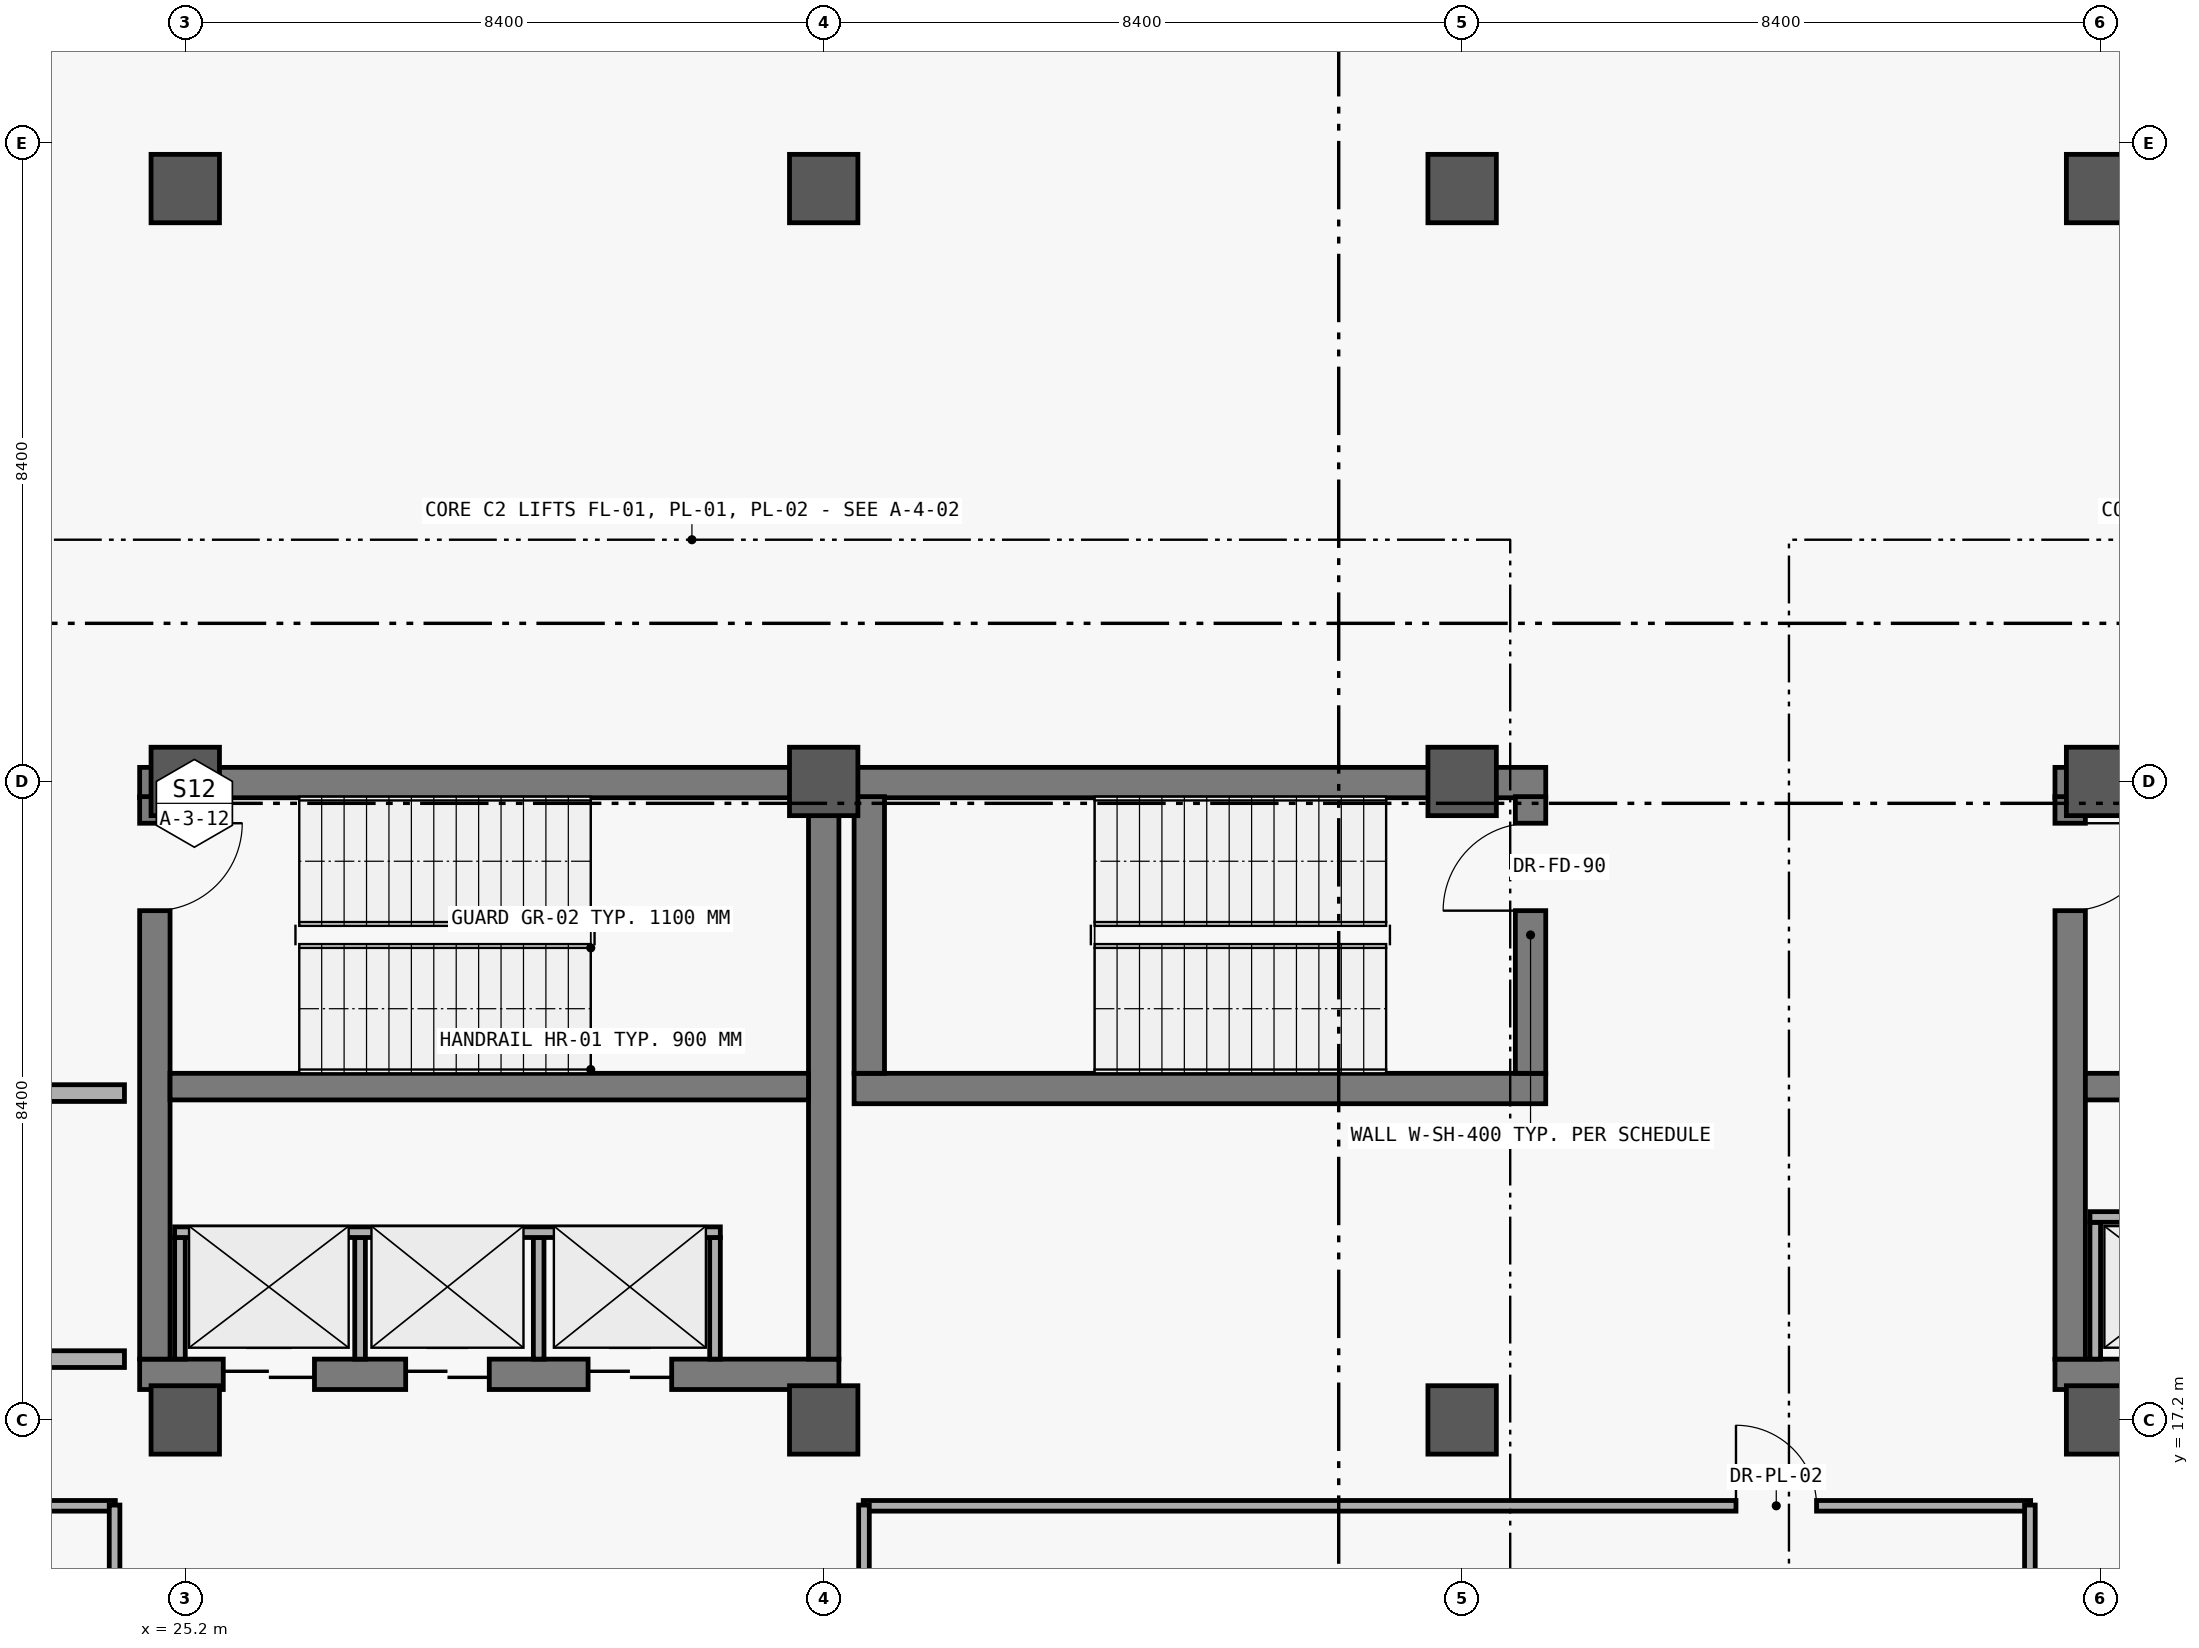
"""IFC4 building model, lengths in metres.
Left out: names, types, materials, properties, quantities, classifications, styles, units other than length and angle.
Written with IfcOpenShell. Run it as: python <this file> out.ifc"""

import sys

from ifc_helpers import new_model, si_unit, direction, frame, frame_2d, origin, origin_2d, place, context, subcontext, project, spatial, rectangle, extrude, element, fill, save


model = new_model("IFC4")
c1 = context("Model", 3, precision=1e-05, world=origin(), true_north=direction((0.0, 1.0)))
c2 = subcontext(c1, "Body", "Model", "MODEL_VIEW")
j1 = project(units=[si_unit("LENGTHUNIT", "METRE"), si_unit("PLANEANGLEUNIT", "RADIAN")], contexts=[c1])
p1 = place(None, origin())
s1 = spatial("IfcSite", under=j1, at=p1, CompositionType="ELEMENT")
p2 = place(p1, origin())
s2 = spatial("IfcBuilding", under=s1, at=p2, CompositionType="ELEMENT")
p3 = place(p2, frame((0.0, 0.0, -4.8)))
s3 = spatial("IfcBuildingStorey", under=s2, at=p3, CompositionType="ELEMENT", Elevation=-4.8)
for number, where, z_axis, x_axis in (
    (1, (25.2, 17.2, 0.0), (0.0, 0.0, 1.0), (1.0, 0.0, 0.0)),
    (2, (25.2, 25.6, 0.0), (0.0, 0.0, 1.0), (1.0, 0.0, 0.0)),
    (3, (25.2, 33.4, 0.0), (0.0, 0.0, 1.0), (1.0, 0.0, 0.0)),
    (4, (33.6, 17.2, 0.0), (0.0, 0.0, 1.0), (1.0, 0.0, 0.0)),
    (5, (33.6, 25.6, 0.0), (0.0, 0.0, 1.0), (1.0, 0.0, 0.0)),
    (6, (33.6, 33.4, 0.0), (0.0, 0.0, 1.0), (1.0, 0.0, 0.0)),
    (7, (42.0, 17.2, 0.0), (0.0, 0.0, 1.0), (1.0, 0.0, 0.0)),
    (8, (42.0, 25.6, 0.0), (0.0, 0.0, 1.0), (1.0, 0.0, 0.0)),
    (9, (42.0, 33.4, 0.0), (0.0, 0.0, 1.0), (1.0, 0.0, 0.0)),
    (10, (50.4, 17.2, 0.0), (0.0, 0.0, 1.0), (1.0, 0.0, 0.0)),
    (11, (50.4, 25.6, 0.0), (0.0, 0.0, 1.0), (1.0, 0.0, 0.0)),
    (12, (50.4, 33.4, 0.0), (0.0, 0.0, 1.0), (1.0, 0.0, 0.0)),
):
    element("IfcColumn", number, at=place(p3, frame(where, z_axis=z_axis, x_axis=x_axis)), inside=s3, PredefinedType="COLUMN", context=c2, shape_type="SweptSolid", body=[
        extrude(rectangle(XDim=0.9, YDim=0.9, at=origin_2d()), origin(), (0.0, 0.0, 1.0), 4.8),
    ])
p4 = place(p3, frame((24.6, 17.8, 0.0), z_axis=(0.0, 0.0, 1.0), x_axis=(1.0, 0.0, 0.0)))
e13 = element("IfcWall", 13, at=p4, inside=s3, PredefinedType="SHEAR", context=c2, shape_type="SweptSolid", body=[
    extrude(rectangle(XDim=9.2, YDim=0.4, at=frame_2d((4.6, 0.0))), origin(), (0.0, 0.0, 1.0), 4.48),
])
p5 = place(p4, frame((1.1, 0.0, 0.0)))
e14 = element("IfcOpeningElement", 14, at=p5, cuts=e13, PredefinedType="OPENING", context=c2, shape_type="SweptSolid", body=[
    extrude(rectangle(XDim=1.2, YDim=2.2, at=frame_2d((0.6, 1.1))), frame((0.0, 0.21, 0.0), z_axis=(0.0, -1.0, 0.0), x_axis=(1.0, 0.0, 0.0)), (0.0, 0.0, 1.0), 0.42),
])
p6 = place(p4, frame((3.5, 0.0, 0.0)))
e15 = element("IfcOpeningElement", 15, at=p6, cuts=e13, PredefinedType="OPENING", context=c2, shape_type="SweptSolid", body=[
    extrude(rectangle(XDim=1.1, YDim=2.2, at=frame_2d((0.55, 1.1))), frame((0.0, 0.21, 0.0), z_axis=(0.0, -1.0, 0.0), x_axis=(1.0, 0.0, 0.0)), (0.0, 0.0, 1.0), 0.42),
])
p7 = place(p4, frame((5.9, 0.0, 0.0)))
e16 = element("IfcOpeningElement", 16, at=p7, cuts=e13, PredefinedType="OPENING", context=c2, shape_type="SweptSolid", body=[
    extrude(rectangle(XDim=1.1, YDim=2.2, at=frame_2d((0.55, 1.1))), frame((0.0, 0.21, 0.0), z_axis=(0.0, -1.0, 0.0), x_axis=(1.0, 0.0, 0.0)), (0.0, 0.0, 1.0), 0.42),
])
p8 = place(p3, frame((33.8, 25.585, 0.0), z_axis=(0.0, 0.0, 1.0), x_axis=(-1.0, 0.0, 0.0)))
e17 = element("IfcWall", 17, at=p8, inside=s3, PredefinedType="SHEAR", context=c2, shape_type="SweptSolid", body=[
    extrude(rectangle(XDim=9.2, YDim=0.4, at=frame_2d((4.6, 0.0))), origin(), (0.0, 0.0, 1.0), 4.48),
])
p9 = place(p3, frame((24.8, 25.4, 0.0), z_axis=(0.0, 0.0, 1.0), x_axis=(0.0, -1.0, 0.0)))
e18 = element("IfcWall", 18, at=p9, inside=s3, PredefinedType="SHEAR", context=c2, shape_type="SweptSolid", body=[
    extrude(rectangle(XDim=7.4, YDim=0.4, at=frame_2d((3.7, 0.0))), origin(), (0.0, 0.0, 1.0), 4.48),
])
p10 = place(p9, frame((0.35, 0.0, 0.0)))
e19 = element("IfcOpeningElement", 19, at=p10, cuts=e18, PredefinedType="OPENING", context=c2, shape_type="SweptSolid", body=[
    extrude(rectangle(XDim=1.15, YDim=2.2, at=frame_2d((0.575, 1.1))), frame((0.0, 0.21, 0.0), z_axis=(0.0, -1.0, 0.0), x_axis=(1.0, 0.0, 0.0)), (0.0, 0.0, 1.0), 0.42),
])
p11 = place(p3, frame((33.6, 18.0, 0.0), z_axis=(0.0, 0.0, 1.0), x_axis=(0.0, 1.0, 0.0)))
e20 = element("IfcWall", 20, at=p11, inside=s3, PredefinedType="SHEAR", context=c2, shape_type="SweptSolid", body=[
    extrude(rectangle(XDim=7.4, YDim=0.4, at=frame_2d((3.7, 0.0))), origin(), (0.0, 0.0, 1.0), 4.48),
])
p12 = place(p3, frame((25.0, 21.585, 0.0), z_axis=(0.0, 0.0, 1.0), x_axis=(1.0, 0.0, 0.0)))
e21 = element("IfcWall", 21, at=p12, inside=s3, PredefinedType="SHEAR", context=c2, shape_type="SweptSolid", body=[
    extrude(rectangle(XDim=8.4, YDim=0.35, at=frame_2d((4.2, 0.0))), origin(), (0.0, 0.0, 1.0), 4.48),
])
for number, where, z_axis, x_axis in (
    (22, (25.13, 18.0, 0.0), (0.0, 0.0, 1.0), (0.0, 1.0, 0.0)),
    (23, (27.5, 18.0, 0.0), (0.0, 0.0, 1.0), (0.0, 1.0, 0.0)),
    (24, (29.85, 18.0, 0.0), (0.0, 0.0, 1.0), (0.0, 1.0, 0.0)),
    (25, (32.17, 18.0, 0.0), (0.0, 0.0, 1.0), (0.0, 1.0, 0.0)),
):
    element("IfcWall", number, at=place(p3, frame(where, z_axis=z_axis, x_axis=x_axis)), inside=s3, PredefinedType="PARTITIONING", context=c2, shape_type="SweptSolid", body=[
        extrude(rectangle(XDim=1.6, YDim=0.14, at=frame_2d((0.8, 0.0))), origin(), (0.0, 0.0, 1.0), 3.63),
    ])
p13 = place(p3, frame((25.06, 19.67, 0.0), z_axis=(0.0, 0.0, 1.0), x_axis=(1.0, 0.0, 0.0)))
e26 = element("IfcWall", 26, at=p13, inside=s3, PredefinedType="PARTITIONING", context=c2, shape_type="SweptSolid", body=[
    extrude(rectangle(XDim=7.18, YDim=0.14, at=frame_2d((3.59, 0.0))), origin(), (0.0, 0.0, 1.0), 3.63),
])
p14 = place(p3, frame((19.6, 18.0, 0.0), z_axis=(0.0, 0.0, 1.0), x_axis=(1.0, 0.0, 0.0)))
e27 = element("IfcWall", 27, at=p14, inside=s3, PredefinedType="SOLIDWALL", context=c2, shape_type="SweptSolid", body=[
    extrude(rectangle(XDim=4.8, YDim=0.22, at=frame_2d((2.4, 0.0))), origin(), (0.0, 0.0, 1.0), 3.63),
])
p15 = place(p3, frame((19.6, 21.5, 0.0), z_axis=(0.0, 0.0, 1.0), x_axis=(1.0, 0.0, 0.0)))
e28 = element("IfcWall", 28, at=p15, inside=s3, PredefinedType="SOLIDWALL", context=c2, shape_type="SweptSolid", body=[
    extrude(rectangle(XDim=4.8, YDim=0.22, at=frame_2d((2.4, 0.0))), origin(), (0.0, 0.0, 1.0), 3.63),
])
p16 = place(p15, frame((2.05, 0.0, 0.0)))
e29 = element("IfcOpeningElement", 29, at=p16, cuts=e28, PredefinedType="OPENING", context=c2, shape_type="SweptSolid", body=[
    extrude(rectangle(XDim=1.25, YDim=2.2, at=frame_2d((0.625, 1.1))), frame((0.0, 0.12, 0.0), z_axis=(0.0, -1.0, 0.0), x_axis=(1.0, 0.0, 0.0)), (0.0, 0.0, 1.0), 0.24),
])
p17 = place(p3, frame((49.8, 17.8, 0.0), z_axis=(0.0, 0.0, 1.0), x_axis=(1.0, 0.0, 0.0)))
e30 = element("IfcWall", 30, at=p17, inside=s3, PredefinedType="SHEAR", context=c2, shape_type="SweptSolid", body=[
    extrude(rectangle(XDim=9.2, YDim=0.4, at=frame_2d((4.6, 0.0))), origin(), (0.0, 0.0, 1.0), 4.48),
])
p18 = place(p17, frame((1.1, 0.0, 0.0)))
e31 = element("IfcOpeningElement", 31, at=p18, cuts=e30, PredefinedType="OPENING", context=c2, shape_type="SweptSolid", body=[
    extrude(rectangle(XDim=1.2, YDim=2.2, at=frame_2d((0.6, 1.1))), frame((0.0, 0.21, 0.0), z_axis=(0.0, -1.0, 0.0), x_axis=(1.0, 0.0, 0.0)), (0.0, 0.0, 1.0), 0.42),
])
p19 = place(p17, frame((3.5, 0.0, 0.0)))
e32 = element("IfcOpeningElement", 32, at=p19, cuts=e30, PredefinedType="OPENING", context=c2, shape_type="SweptSolid", body=[
    extrude(rectangle(XDim=1.1, YDim=2.2, at=frame_2d((0.55, 1.1))), frame((0.0, 0.21, 0.0), z_axis=(0.0, -1.0, 0.0), x_axis=(1.0, 0.0, 0.0)), (0.0, 0.0, 1.0), 0.42),
])
p20 = place(p17, frame((5.9, 0.0, 0.0)))
e33 = element("IfcOpeningElement", 33, at=p20, cuts=e30, PredefinedType="OPENING", context=c2, shape_type="SweptSolid", body=[
    extrude(rectangle(XDim=1.3, YDim=2.3, at=frame_2d((0.65, 1.15))), frame((0.0, 0.21, 0.0), z_axis=(0.0, -1.0, 0.0), x_axis=(1.0, 0.0, 0.0)), (0.0, 0.0, 1.0), 0.42),
])
p21 = place(p3, frame((59.0, 25.585, 0.0), z_axis=(0.0, 0.0, 1.0), x_axis=(-1.0, 0.0, 0.0)))
e34 = element("IfcWall", 34, at=p21, inside=s3, PredefinedType="SHEAR", context=c2, shape_type="SweptSolid", body=[
    extrude(rectangle(XDim=9.2, YDim=0.4, at=frame_2d((4.6, 0.0))), origin(), (0.0, 0.0, 1.0), 4.48),
])
p22 = place(p3, frame((50.0, 25.4, 0.0), z_axis=(0.0, 0.0, 1.0), x_axis=(0.0, -1.0, 0.0)))
e35 = element("IfcWall", 35, at=p22, inside=s3, PredefinedType="SHEAR", context=c2, shape_type="SweptSolid", body=[
    extrude(rectangle(XDim=7.4, YDim=0.4, at=frame_2d((3.7, 0.0))), origin(), (0.0, 0.0, 1.0), 4.48),
])
p23 = place(p22, frame((0.35, 0.0, 0.0)))
e36 = element("IfcOpeningElement", 36, at=p23, cuts=e35, PredefinedType="OPENING", context=c2, shape_type="SweptSolid", body=[
    extrude(rectangle(XDim=1.15, YDim=2.2, at=frame_2d((0.575, 1.1))), frame((0.0, 0.21, 0.0), z_axis=(0.0, -1.0, 0.0), x_axis=(1.0, 0.0, 0.0)), (0.0, 0.0, 1.0), 0.42),
])
p24 = place(p3, frame((50.2, 21.585, 0.0), z_axis=(0.0, 0.0, 1.0), x_axis=(1.0, 0.0, 0.0)))
e37 = element("IfcWall", 37, at=p24, inside=s3, PredefinedType="SHEAR", context=c2, shape_type="SweptSolid", body=[
    extrude(rectangle(XDim=8.4, YDim=0.35, at=frame_2d((4.2, 0.0))), origin(), (0.0, 0.0, 1.0), 4.48),
])
p25 = place(p3, frame((50.33, 18.0, 0.0), z_axis=(0.0, 0.0, 1.0), x_axis=(0.0, 1.0, 0.0)))
e38 = element("IfcWall", 38, at=p25, inside=s3, PredefinedType="PARTITIONING", context=c2, shape_type="SweptSolid", body=[
    extrude(rectangle(XDim=1.8, YDim=0.14, at=frame_2d((0.9, 0.0))), origin(), (0.0, 0.0, 1.0), 3.63),
])
p26 = place(p3, frame((50.26, 19.87, 0.0), z_axis=(0.0, 0.0, 1.0), x_axis=(1.0, 0.0, 0.0)))
e39 = element("IfcWall", 39, at=p26, inside=s3, PredefinedType="PARTITIONING", context=c2, shape_type="SweptSolid", body=[
    extrude(rectangle(XDim=7.38, YDim=0.14, at=frame_2d((3.69, 0.0))), origin(), (0.0, 0.0, 1.0), 3.63),
])
for number, where, z_axis, x_axis in (
    (40, (34.0, 21.56, 0.0), (0.0, 0.0, 1.0), (1.0, 0.0, 0.0)),
    (41, (43.1, 25.585, 0.0), (0.0, 0.0, 1.0), (-1.0, 0.0, 0.0)),
):
    element("IfcWall", number, at=place(p3, frame(where, z_axis=z_axis, x_axis=x_axis)), inside=s3, PredefinedType="SHEAR", context=c2, shape_type="SweptSolid", body=[
        extrude(rectangle(XDim=9.1, YDim=0.4, at=frame_2d((4.55, 0.0))), origin(), (0.0, 0.0, 1.0), 4.48),
    ])
p27 = place(p3, frame((34.2, 25.4, 0.0), z_axis=(0.0, 0.0, 1.0), x_axis=(0.0, -1.0, 0.0)))
e42 = element("IfcWall", 42, at=p27, inside=s3, PredefinedType="SHEAR", context=c2, shape_type="SweptSolid", body=[
    extrude(rectangle(XDim=3.64, YDim=0.4, at=frame_2d((1.82, 0.0))), origin(), (0.0, 0.0, 1.0), 4.48),
])
p28 = place(p3, frame((42.9, 21.76, 0.0), z_axis=(0.0, 0.0, 1.0), x_axis=(0.0, 1.0, 0.0)))
e43 = element("IfcWall", 43, at=p28, inside=s3, PredefinedType="SHEAR", context=c2, shape_type="SweptSolid", body=[
    extrude(rectangle(XDim=3.64, YDim=0.4, at=frame_2d((1.82, 0.0))), origin(), (0.0, 0.0, 1.0), 4.48),
])
p29 = place(p28, frame((2.14, 0.0, 0.0)))
e44 = element("IfcOpeningElement", 44, at=p29, cuts=e43, PredefinedType="OPENING", context=c2, shape_type="SweptSolid", body=[
    extrude(rectangle(XDim=1.15, YDim=2.2, at=frame_2d((0.575, 1.1))), frame((0.0, 0.21, 0.0), z_axis=(0.0, -1.0, 0.0), x_axis=(1.0, 0.0, 0.0)), (0.0, 0.0, 1.0), 0.42),
])
p30 = place(p3, frame((8.85, 16.07, 0.0), z_axis=(0.0, 0.0, 1.0), x_axis=(1.0, 0.0, 0.0)))
e45 = element("IfcWall", 45, at=p30, inside=s3, PredefinedType="PARTITIONING", context=c2, shape_type="SweptSolid", body=[
    extrude(rectangle(XDim=15.43, YDim=0.14, at=frame_2d((7.715, 0.0))), origin(), (0.0, 0.0, 1.0), 3.58),
])
p31 = place(p30, frame((3.76, 0.0, 0.0)))
e46 = element("IfcOpeningElement", 46, at=p31, cuts=e45, PredefinedType="OPENING", context=c2, shape_type="SweptSolid", body=[
    extrude(rectangle(XDim=1.06, YDim=2.2, at=frame_2d((0.53, 1.1))), frame((0.0, 0.08, 0.0), z_axis=(0.0, -1.0, 0.0), x_axis=(1.0, 0.0, 0.0)), (0.0, 0.0, 1.0), 0.16),
])
p32 = place(p3, frame((34.12, 16.07, 0.0), z_axis=(0.0, 0.0, 1.0), x_axis=(1.0, 0.0, 0.0)))
e47 = element("IfcWall", 47, at=p32, inside=s3, PredefinedType="PARTITIONING", context=c2, shape_type="SweptSolid", body=[
    extrude(rectangle(XDim=15.36, YDim=0.14, at=frame_2d((7.68, 0.0))), origin(), (0.0, 0.0, 1.0), 3.58),
])
p33 = place(p32, frame((11.483, 0.0, 0.0)))
e48 = element("IfcOpeningElement", 48, at=p33, cuts=e47, PredefinedType="OPENING", context=c2, shape_type="SweptSolid", body=[
    extrude(rectangle(XDim=1.06, YDim=2.2, at=frame_2d((0.53, 1.1))), frame((0.0, 0.08, 0.0), z_axis=(0.0, -1.0, 0.0), x_axis=(1.0, 0.0, 0.0)), (0.0, 0.0, 1.0), 0.16),
])
for number, where, z_axis, x_axis in (
    (49, (24.27, 6.45, 0.0), (0.0, 0.0, 1.0), (0.0, 1.0, 0.0)),
    (50, (34.13, 6.45, 0.0), (0.0, 0.0, 1.0), (0.0, 1.0, 0.0)),
    (51, (49.47, 6.45, 0.0), (0.0, 0.0, 1.0), (0.0, 1.0, 0.0)),
):
    element("IfcWall", number, at=place(p3, frame(where, z_axis=z_axis, x_axis=x_axis)), inside=s3, PredefinedType="PARTITIONING", context=c2, shape_type="SweptSolid", body=[
        extrude(rectangle(XDim=9.63, YDim=0.14, at=frame_2d((4.815, 0.0))), origin(), (0.0, 0.0, 1.0), 3.58),
    ])
p34 = place(p10, origin())
e52 = element("IfcDoor", 52, at=p34, inside=s3, OperationType="SINGLE_SWING_LEFT", PredefinedType="DOOR", context=c2, shape_type="SweptSolid", body=[
    extrude(rectangle(XDim=1.15, YDim=2.2, at=frame_2d((0.575, 1.1))), frame((0.0, 0.025, 0.0), z_axis=(0.0, -1.0, 0.0), x_axis=(1.0, 0.0, 0.0)), (0.0, 0.0, 1.0), 0.05),
])
fill(e19, e52)
p35 = place(p5, origin())
e53 = element("IfcDoor", 53, at=p35, inside=s3, OperationType="DOUBLE_DOOR_SLIDING", PredefinedType="DOOR", context=c2, shape_type="SweptSolid", body=[
    extrude(rectangle(XDim=1.2, YDim=2.2, at=frame_2d((0.6, 1.1))), frame((0.0, 0.025, 0.0), z_axis=(0.0, -1.0, 0.0), x_axis=(1.0, 0.0, 0.0)), (0.0, 0.0, 1.0), 0.05),
])
fill(e14, e53)
p36 = place(p6, origin())
e54 = element("IfcDoor", 54, at=p36, inside=s3, OperationType="DOUBLE_DOOR_SLIDING", PredefinedType="DOOR", context=c2, shape_type="SweptSolid", body=[
    extrude(rectangle(XDim=1.1, YDim=2.2, at=frame_2d((0.55, 1.1))), frame((0.0, 0.025, 0.0), z_axis=(0.0, -1.0, 0.0), x_axis=(1.0, 0.0, 0.0)), (0.0, 0.0, 1.0), 0.05),
])
fill(e15, e54)
p37 = place(p7, origin())
e55 = element("IfcDoor", 55, at=p37, inside=s3, OperationType="DOUBLE_DOOR_SLIDING", PredefinedType="DOOR", context=c2, shape_type="SweptSolid", body=[
    extrude(rectangle(XDim=1.1, YDim=2.2, at=frame_2d((0.55, 1.1))), frame((0.0, 0.025, 0.0), z_axis=(0.0, -1.0, 0.0), x_axis=(1.0, 0.0, 0.0)), (0.0, 0.0, 1.0), 0.05),
])
fill(e16, e55)
p38 = place(p23, origin())
e56 = element("IfcDoor", 56, at=p38, inside=s3, OperationType="SINGLE_SWING_LEFT", PredefinedType="DOOR", context=c2, shape_type="SweptSolid", body=[
    extrude(rectangle(XDim=1.15, YDim=2.2, at=frame_2d((0.575, 1.1))), frame((0.0, 0.025, 0.0), z_axis=(0.0, -1.0, 0.0), x_axis=(1.0, 0.0, 0.0)), (0.0, 0.0, 1.0), 0.05),
])
fill(e36, e56)
p39 = place(p29, origin())
e57 = element("IfcDoor", 57, at=p39, inside=s3, OperationType="SINGLE_SWING_LEFT", PredefinedType="DOOR", context=c2, shape_type="SweptSolid", body=[
    extrude(rectangle(XDim=1.15, YDim=2.2, at=frame_2d((0.575, 1.1))), frame((0.0, 0.025, 0.0), z_axis=(0.0, -1.0, 0.0), x_axis=(1.0, 0.0, 0.0)), (0.0, 0.0, 1.0), 0.05),
])
fill(e44, e57)
p40 = place(p33, origin())
e58 = element("IfcDoor", 58, at=p40, inside=s3, OperationType="SINGLE_SWING_LEFT", PredefinedType="DOOR", context=c2, shape_type="SweptSolid", body=[
    extrude(rectangle(XDim=1.06, YDim=2.2, at=frame_2d((0.53, 1.1))), frame((0.0, 0.025, 0.0), z_axis=(0.0, -1.0, 0.0), x_axis=(1.0, 0.0, 0.0)), (0.0, 0.0, 1.0), 0.05),
])
fill(e48, e58)
save(model, sys.argv[1])
